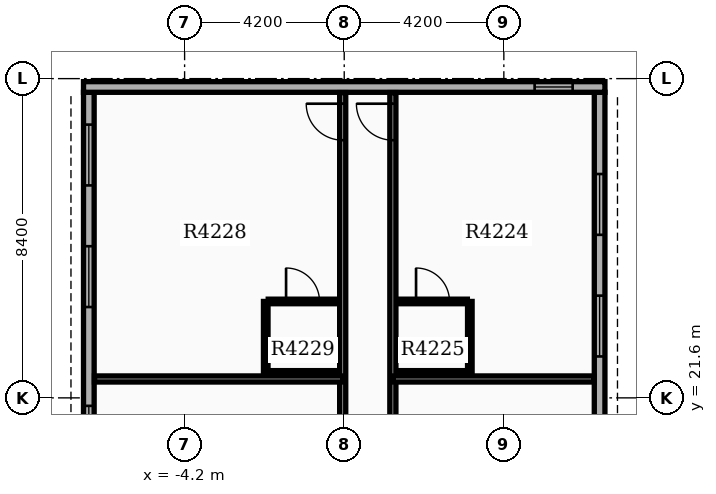
"""IFC4 building model, lengths in metres.
Left out: names, types, materials, properties, quantities, classifications, styles, units other than length and angle.
Written with IfcOpenShell. Run it as: python <this file> out.ifc"""

import sys

from ifc_helpers import new_model, si_unit, direction, frame, frame_2d, origin, place, context, subcontext, project, spatial, rectangle, extrude, element, fill, save


model = new_model("IFC4")
c1 = context("Model", 3, precision=1e-05, world=origin(), true_north=direction((0.0, 1.0)))
c2 = subcontext(c1, "Body", "Model", "MODEL_VIEW")
j1 = project(units=[si_unit("LENGTHUNIT", "METRE"), si_unit("PLANEANGLEUNIT", "RADIAN")], contexts=[c1])
p1 = place(None, origin())
s1 = spatial("IfcSite", under=j1, at=p1, CompositionType="ELEMENT")
p2 = place(p1, origin())
s2 = spatial("IfcBuilding", under=s1, at=p2, CompositionType="ELEMENT")
p3 = place(p2, frame((0.0, 0.0, 265.5)))
s3 = spatial("IfcBuildingStorey", under=s2, at=p3, CompositionType="ELEMENT", Elevation=265.5)
p4 = place(p3, frame((6.72, 14.94, 0.0), z_axis=(0.0, 0.0, 1.0), x_axis=(0.0, 1.0, 0.0)))
e1 = element("IfcWall", 1, at=p4, inside=s3, PredefinedType="STANDARD", context=c2, shape_type="SweptSolid", body=[
    extrude(rectangle(XDim=14.7, YDim=0.28, at=frame_2d((7.35, 0.0))), origin(), (0.0, 0.0, 1.0), 3.18),
])
p5 = place(p4, frame((0.85, 0.0, 0.8)))
e2 = element("IfcOpeningElement", 2, at=p5, cuts=e1, PredefinedType="OPENING", context=c2, shape_type="SweptSolid", body=[
    extrude(rectangle(XDim=1.6, YDim=1.7, at=frame_2d((0.8, 0.85))), frame((0.0, 0.15, 0.0), z_axis=(0.0, -1.0, 0.0), x_axis=(1.0, 0.0, 0.0)), (0.0, 0.0, 1.0), 0.3),
])
p6 = place(p4, frame((4.05, 0.0, 0.8)))
e3 = element("IfcOpeningElement", 3, at=p6, cuts=e1, PredefinedType="OPENING", context=c2, shape_type="SweptSolid", body=[
    extrude(rectangle(XDim=1.6, YDim=1.7, at=frame_2d((0.8, 0.85))), frame((0.0, 0.15, 0.0), z_axis=(0.0, -1.0, 0.0), x_axis=(1.0, 0.0, 0.0)), (0.0, 0.0, 1.0), 0.3),
])
p7 = place(p4, frame((7.75, 0.0, 0.8)))
e4 = element("IfcOpeningElement", 4, at=p7, cuts=e1, PredefinedType="OPENING", context=c2, shape_type="SweptSolid", body=[
    extrude(rectangle(XDim=1.6, YDim=1.7, at=frame_2d((0.8, 0.85))), frame((0.0, 0.15, 0.0), z_axis=(0.0, -1.0, 0.0), x_axis=(1.0, 0.0, 0.0)), (0.0, 0.0, 1.0), 0.3),
])
p8 = place(p4, frame((10.95, 0.0, 0.8)))
e5 = element("IfcOpeningElement", 5, at=p8, cuts=e1, PredefinedType="OPENING", context=c2, shape_type="SweptSolid", body=[
    extrude(rectangle(XDim=1.6, YDim=1.7, at=frame_2d((0.8, 0.85))), frame((0.0, 0.15, 0.0), z_axis=(0.0, -1.0, 0.0), x_axis=(1.0, 0.0, 0.0)), (0.0, 0.0, 1.0), 0.3),
])
p9 = place(p3, frame((-6.72, 29.64, 0.0), z_axis=(0.0, 0.0, 1.0), x_axis=(0.0, -1.0, 0.0)))
e6 = element("IfcWall", 6, at=p9, inside=s3, PredefinedType="STANDARD", context=c2, shape_type="SweptSolid", body=[
    extrude(rectangle(XDim=14.7, YDim=0.28, at=frame_2d((7.35, 0.0))), origin(), (0.0, 0.0, 1.0), 3.18),
])
p10 = place(p9, frame((0.85, 0.0, 0.8)))
e7 = element("IfcOpeningElement", 7, at=p10, cuts=e6, PredefinedType="OPENING", context=c2, shape_type="SweptSolid", body=[
    extrude(rectangle(XDim=1.6, YDim=1.7, at=frame_2d((0.8, 0.85))), frame((0.0, 0.15, 0.0), z_axis=(0.0, -1.0, 0.0), x_axis=(1.0, 0.0, 0.0)), (0.0, 0.0, 1.0), 0.3),
])
p11 = place(p9, frame((4.05, 0.0, 0.8)))
e8 = element("IfcOpeningElement", 8, at=p11, cuts=e6, PredefinedType="OPENING", context=c2, shape_type="SweptSolid", body=[
    extrude(rectangle(XDim=1.6, YDim=1.7, at=frame_2d((0.8, 0.85))), frame((0.0, 0.15, 0.0), z_axis=(0.0, -1.0, 0.0), x_axis=(1.0, 0.0, 0.0)), (0.0, 0.0, 1.0), 0.3),
])
p12 = place(p9, frame((8.25, 0.0, 0.8)))
e9 = element("IfcOpeningElement", 9, at=p12, cuts=e6, PredefinedType="OPENING", context=c2, shape_type="SweptSolid", body=[
    extrude(rectangle(XDim=1.6, YDim=1.7, at=frame_2d((0.8, 0.85))), frame((0.0, 0.15, 0.0), z_axis=(0.0, -1.0, 0.0), x_axis=(1.0, 0.0, 0.0)), (0.0, 0.0, 1.0), 0.3),
])
p13 = place(p9, frame((11.45, 0.0, 0.8)))
e10 = element("IfcOpeningElement", 10, at=p13, cuts=e6, PredefinedType="OPENING", context=c2, shape_type="SweptSolid", body=[
    extrude(rectangle(XDim=1.6, YDim=1.7, at=frame_2d((0.8, 0.85))), frame((0.0, 0.15, 0.0), z_axis=(0.0, -1.0, 0.0), x_axis=(1.0, 0.0, 0.0)), (0.0, 0.0, 1.0), 0.3),
])
p14 = place(p3, frame((6.86, 29.78, 0.0), z_axis=(0.0, 0.0, 1.0), x_axis=(-1.0, 0.0, 0.0)))
e11 = element("IfcWall", 11, at=p14, inside=s3, PredefinedType="STANDARD", context=c2, shape_type="SweptSolid", body=[
    extrude(rectangle(XDim=13.72, YDim=0.28, at=frame_2d((6.86, 0.0))), origin(), (0.0, 0.0, 1.0), 3.18),
])
p15 = place(p14, frame((0.85, 0.0, 0.85)))
e12 = element("IfcOpeningElement", 12, at=p15, cuts=e11, PredefinedType="OPENING", context=c2, shape_type="SweptSolid", body=[
    extrude(rectangle(XDim=1.0, YDim=1.5, at=frame_2d((0.5, 0.75))), frame((0.0, 0.15, 0.0), z_axis=(0.0, -1.0, 0.0), x_axis=(1.0, 0.0, 0.0)), (0.0, 0.0, 1.0), 0.3),
])
p16 = place(p3, frame((1.28, 14.62, 0.0), z_axis=(0.0, 0.0, 1.0), x_axis=(0.0, 1.0, 0.0)))
e13 = element("IfcWall", 13, at=p16, inside=s3, PredefinedType="PARTITIONING", context=c2, shape_type="SweptSolid", body=[
    extrude(rectangle(XDim=15.012, YDim=0.16, at=frame_2d((7.506, 0.0))), origin(), (0.0, 0.0, 1.0), 3.17),
])
p17 = place(p16, frame((2.728, 0.0, 0.0)))
e14 = element("IfcOpeningElement", 14, at=p17, cuts=e13, PredefinedType="OPENING", context=c2, shape_type="SweptSolid", body=[
    extrude(rectangle(XDim=0.96, YDim=2.15, at=frame_2d((0.48, 1.075))), frame((0.0, 0.09, 0.0), z_axis=(0.0, -1.0, 0.0), x_axis=(1.0, 0.0, 0.0)), (0.0, 0.0, 1.0), 0.18),
])
p18 = place(p16, frame((13.76, 0.0, 0.0)))
e15 = element("IfcOpeningElement", 15, at=p18, cuts=e13, PredefinedType="OPENING", context=c2, shape_type="SweptSolid", body=[
    extrude(rectangle(XDim=0.96, YDim=2.15, at=frame_2d((0.48, 1.075))), frame((0.0, 0.09, 0.0), z_axis=(0.0, -1.0, 0.0), x_axis=(1.0, 0.0, 0.0)), (0.0, 0.0, 1.0), 0.18),
])
p19 = place(p3, frame((1.28, 22.097, 0.0), z_axis=(0.0, 0.0, 1.0), x_axis=(1.0, 0.0, 0.0)))
e16 = element("IfcWall", 16, at=p19, inside=s3, PredefinedType="PARTITIONING", context=c2, shape_type="SweptSolid", body=[
    extrude(rectangle(XDim=5.292, YDim=0.16, at=frame_2d((2.646, 0.0))), origin(), (0.0, 0.0, 1.0), 3.17),
])
p20 = place(p3, frame((1.42, 24.137, 0.0), z_axis=(0.0, 0.0, 1.0), x_axis=(1.0, 0.0, 0.0)))
e17 = element("IfcWall", 17, at=p20, inside=s3, PredefinedType="PARTITIONING", context=c2, shape_type="SweptSolid", body=[
    extrude(rectangle(XDim=1.82, YDim=0.12, at=frame_2d((0.91, 0.0))), origin(), (0.0, 0.0, 1.0), 3.17),
])
p21 = place(p20, frame((0.47, 0.0, 0.0)))
e18 = element("IfcOpeningElement", 18, at=p21, cuts=e17, PredefinedType="OPENING", context=c2, shape_type="SweptSolid", body=[
    extrude(rectangle(XDim=0.88, YDim=2.1, at=frame_2d((0.44, 1.05))), frame((0.0, 0.07, 0.0), z_axis=(0.0, -1.0, 0.0), x_axis=(1.0, 0.0, 0.0)), (0.0, 0.0, 1.0), 0.14),
])
p22 = place(p3, frame((1.42, 22.257, 0.0), z_axis=(0.0, 0.0, 1.0), x_axis=(1.0, 0.0, 0.0)))
e19 = element("IfcWall", 19, at=p22, inside=s3, PredefinedType="PARTITIONING", context=c2, shape_type="SweptSolid", body=[
    extrude(rectangle(XDim=1.82, YDim=0.12, at=frame_2d((0.91, 0.0))), origin(), (0.0, 0.0, 1.0), 3.17),
])
p23 = place(p3, frame((3.305, 22.257, 0.0), z_axis=(0.0, 0.0, 1.0), x_axis=(0.0, 1.0, 0.0)))
e20 = element("IfcWall", 20, at=p23, inside=s3, PredefinedType="PARTITIONING", context=c2, shape_type="SweptSolid", body=[
    extrude(rectangle(XDim=1.88, YDim=0.12, at=frame_2d((0.94, 0.0))), origin(), (0.0, 0.0, 1.0), 3.17),
])
p24 = place(p3, frame((-0.04, 14.62, 0.0), z_axis=(0.0, 0.0, 1.0), x_axis=(0.0, 1.0, 0.0)))
e21 = element("IfcWall", 21, at=p24, inside=s3, PredefinedType="PARTITIONING", context=c2, shape_type="SweptSolid", body=[
    extrude(rectangle(XDim=15.012, YDim=0.16, at=frame_2d((7.506, 0.0))), origin(), (0.0, 0.0, 1.0), 3.17),
])
p25 = place(p24, frame((2.728, 0.0, 0.0)))
e22 = element("IfcOpeningElement", 22, at=p25, cuts=e21, PredefinedType="OPENING", context=c2, shape_type="SweptSolid", body=[
    extrude(rectangle(XDim=0.96, YDim=2.15, at=frame_2d((0.48, 1.075))), frame((0.0, 0.09, 0.0), z_axis=(0.0, -1.0, 0.0), x_axis=(1.0, 0.0, 0.0)), (0.0, 0.0, 1.0), 0.18),
])
p26 = place(p24, frame((13.76, 0.0, 0.0)))
e23 = element("IfcOpeningElement", 23, at=p26, cuts=e21, PredefinedType="OPENING", context=c2, shape_type="SweptSolid", body=[
    extrude(rectangle(XDim=0.96, YDim=2.15, at=frame_2d((0.48, 1.075))), frame((0.0, 0.09, 0.0), z_axis=(0.0, -1.0, 0.0), x_axis=(1.0, 0.0, 0.0)), (0.0, 0.0, 1.0), 0.18),
])
p27 = place(p3, frame((-0.04, 22.097, 0.0), z_axis=(0.0, 0.0, 1.0), x_axis=(-1.0, 0.0, 0.0)))
e24 = element("IfcWall", 24, at=p27, inside=s3, PredefinedType="PARTITIONING", context=c2, shape_type="SweptSolid", body=[
    extrude(rectangle(XDim=6.532, YDim=0.16, at=frame_2d((3.266, 0.0))), origin(), (0.0, 0.0, 1.0), 3.17),
])
p28 = place(p3, frame((-2.0, 24.137, 0.0), z_axis=(0.0, 0.0, 1.0), x_axis=(1.0, 0.0, 0.0)))
e25 = element("IfcWall", 25, at=p28, inside=s3, PredefinedType="PARTITIONING", context=c2, shape_type="SweptSolid", body=[
    extrude(rectangle(XDim=1.82, YDim=0.12, at=frame_2d((0.91, 0.0))), origin(), (0.0, 0.0, 1.0), 3.17),
])
p29 = place(p28, frame((0.47, 0.0, 0.0)))
e26 = element("IfcOpeningElement", 26, at=p29, cuts=e25, PredefinedType="OPENING", context=c2, shape_type="SweptSolid", body=[
    extrude(rectangle(XDim=0.88, YDim=2.1, at=frame_2d((0.44, 1.05))), frame((0.0, 0.07, 0.0), z_axis=(0.0, -1.0, 0.0), x_axis=(1.0, 0.0, 0.0)), (0.0, 0.0, 1.0), 0.14),
])
p30 = place(p3, frame((-2.0, 22.257, 0.0), z_axis=(0.0, 0.0, 1.0), x_axis=(1.0, 0.0, 0.0)))
e27 = element("IfcWall", 27, at=p30, inside=s3, PredefinedType="PARTITIONING", context=c2, shape_type="SweptSolid", body=[
    extrude(rectangle(XDim=1.82, YDim=0.12, at=frame_2d((0.91, 0.0))), origin(), (0.0, 0.0, 1.0), 3.17),
])
p31 = place(p3, frame((-2.065, 22.257, 0.0), z_axis=(0.0, 0.0, 1.0), x_axis=(0.0, 1.0, 0.0)))
e28 = element("IfcWall", 28, at=p31, inside=s3, PredefinedType="PARTITIONING", context=c2, shape_type="SweptSolid", body=[
    extrude(rectangle(XDim=1.88, YDim=0.12, at=frame_2d((0.94, 0.0))), origin(), (0.0, 0.0, 1.0), 3.17),
])
p32 = place(p7, origin())
e29 = element("IfcWindow", 29, at=p32, inside=s3, PartitioningType="SINGLE_PANEL", PredefinedType="WINDOW", context=c2, shape_type="SweptSolid", body=[
    extrude(rectangle(XDim=1.6, YDim=1.7, at=frame_2d((0.8, 0.85))), frame((0.0, 0.03, 0.0), z_axis=(0.0, -1.0, 0.0), x_axis=(1.0, 0.0, 0.0)), (0.0, 0.0, 1.0), 0.06),
])
fill(e4, e29)
p33 = place(p8, origin())
e30 = element("IfcWindow", 30, at=p33, inside=s3, PartitioningType="SINGLE_PANEL", PredefinedType="WINDOW", context=c2, shape_type="SweptSolid", body=[
    extrude(rectangle(XDim=1.6, YDim=1.7, at=frame_2d((0.8, 0.85))), frame((0.0, 0.03, 0.0), z_axis=(0.0, -1.0, 0.0), x_axis=(1.0, 0.0, 0.0)), (0.0, 0.0, 1.0), 0.06),
])
fill(e5, e30)
p34 = place(p10, origin())
e31 = element("IfcWindow", 31, at=p34, inside=s3, PartitioningType="SINGLE_PANEL", PredefinedType="WINDOW", context=c2, shape_type="SweptSolid", body=[
    extrude(rectangle(XDim=1.6, YDim=1.7, at=frame_2d((0.8, 0.85))), frame((0.0, 0.03, 0.0), z_axis=(0.0, -1.0, 0.0), x_axis=(1.0, 0.0, 0.0)), (0.0, 0.0, 1.0), 0.06),
])
fill(e7, e31)
p35 = place(p11, origin())
e32 = element("IfcWindow", 32, at=p35, inside=s3, PartitioningType="SINGLE_PANEL", PredefinedType="WINDOW", context=c2, shape_type="SweptSolid", body=[
    extrude(rectangle(XDim=1.6, YDim=1.7, at=frame_2d((0.8, 0.85))), frame((0.0, 0.03, 0.0), z_axis=(0.0, -1.0, 0.0), x_axis=(1.0, 0.0, 0.0)), (0.0, 0.0, 1.0), 0.06),
])
fill(e8, e32)
p36 = place(p12, origin())
e33 = element("IfcWindow", 33, at=p36, inside=s3, PartitioningType="SINGLE_PANEL", PredefinedType="WINDOW", context=c2, shape_type="SweptSolid", body=[
    extrude(rectangle(XDim=1.6, YDim=1.7, at=frame_2d((0.8, 0.85))), frame((0.0, 0.03, 0.0), z_axis=(0.0, -1.0, 0.0), x_axis=(1.0, 0.0, 0.0)), (0.0, 0.0, 1.0), 0.06),
])
fill(e9, e33)
p37 = place(p15, origin())
e34 = element("IfcWindow", 34, at=p37, inside=s3, PartitioningType="SINGLE_PANEL", PredefinedType="WINDOW", context=c2, shape_type="SweptSolid", body=[
    extrude(rectangle(XDim=1.0, YDim=1.5, at=frame_2d((0.5, 0.75))), frame((0.0, 0.03, 0.0), z_axis=(0.0, -1.0, 0.0), x_axis=(1.0, 0.0, 0.0)), (0.0, 0.0, 1.0), 0.06),
])
fill(e12, e34)
p38 = place(p18, origin())
e35 = element("IfcDoor", 35, at=p38, inside=s3, OperationType="SINGLE_SWING_RIGHT", PredefinedType="DOOR", context=c2, shape_type="SweptSolid", body=[
    extrude(rectangle(XDim=0.96, YDim=2.15, at=frame_2d((0.48, 1.075))), frame((0.0, 0.025, 0.0), z_axis=(0.0, -1.0, 0.0), x_axis=(1.0, 0.0, 0.0)), (0.0, 0.0, 1.0), 0.05),
])
fill(e15, e35)
p39 = place(p21, origin())
e36 = element("IfcDoor", 36, at=p39, inside=s3, OperationType="SINGLE_SWING_LEFT", PredefinedType="DOOR", context=c2, shape_type="SweptSolid", body=[
    extrude(rectangle(XDim=0.88, YDim=2.1, at=frame_2d((0.44, 1.05))), frame((0.0, 0.025, 0.0), z_axis=(0.0, -1.0, 0.0), x_axis=(1.0, 0.0, 0.0)), (0.0, 0.0, 1.0), 0.05),
])
fill(e18, e36)
p40 = place(p26, origin())
e37 = element("IfcDoor", 37, at=p40, inside=s3, OperationType="SINGLE_SWING_RIGHT", PredefinedType="DOOR", context=c2, shape_type="SweptSolid", body=[
    extrude(rectangle(XDim=0.96, YDim=2.15, at=frame_2d((0.48, 1.075))), frame((0.0, 0.025, 0.0), z_axis=(0.0, -1.0, 0.0), x_axis=(1.0, 0.0, 0.0)), (0.0, 0.0, 1.0), 0.05),
])
fill(e23, e37)
p41 = place(p29, origin())
e38 = element("IfcDoor", 38, at=p41, inside=s3, OperationType="SINGLE_SWING_LEFT", PredefinedType="DOOR", context=c2, shape_type="SweptSolid", body=[
    extrude(rectangle(XDim=0.88, YDim=2.1, at=frame_2d((0.44, 1.05))), frame((0.0, 0.025, 0.0), z_axis=(0.0, -1.0, 0.0), x_axis=(1.0, 0.0, 0.0)), (0.0, 0.0, 1.0), 0.05),
])
fill(e26, e38)
save(model, sys.argv[1])
